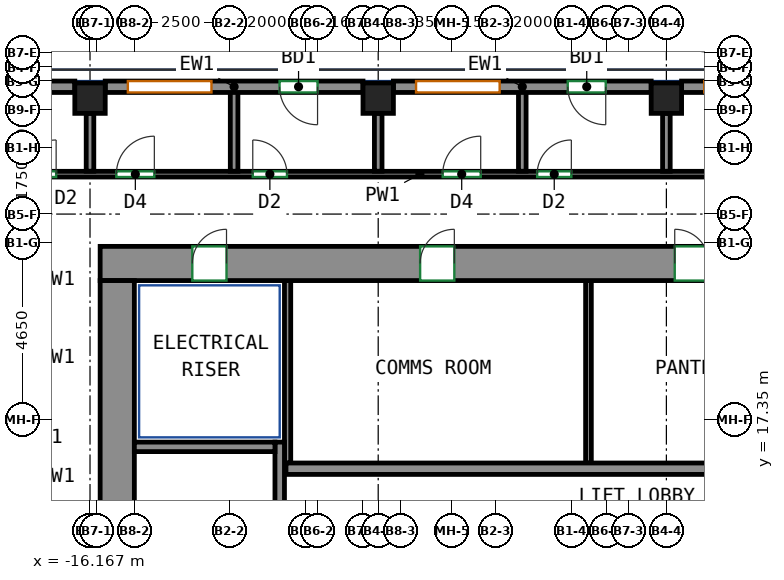
"""IFC4 building model, lengths in metres.
Left out: names, types, materials, properties, quantities, classifications, styles, units other than length and angle.
Written with IfcOpenShell. Run it as: python <this file> out.ifc"""

import sys

from ifc_helpers import new_model, si_unit, direction, frame, frame_2d, origin, origin_2d, place, context, subcontext, project, spatial, rectangle, extrude, source, transform, mapped, element, fill, save


model = new_model("IFC4")
c1 = context("Model", 3, precision=1e-05, world=origin(), true_north=direction((0.0, 1.0)))
c2 = subcontext(c1, "Body", "Model", "MODEL_VIEW")
j1 = project(units=[si_unit("LENGTHUNIT", "METRE"), si_unit("PLANEANGLEUNIT", "RADIAN")], contexts=[c1])
p1 = place(None, origin())
s1 = spatial("IfcSite", under=j1, at=p1, CompositionType="ELEMENT")
p2 = place(p1, origin())
s2 = spatial("IfcBuilding", under=s1, at=p2, CompositionType="ELEMENT")
p3 = place(p2, frame((0.0, 0.0, 168.5)))
s3 = spatial("IfcBuildingStorey", under=s2, at=p3, CompositionType="ELEMENT", Elevation=168.5)
m1 = source(origin(), c2, "Body", "SweptSolid", [
    extrude(rectangle(XDim=0.8, YDim=0.8, at=origin_2d()), origin(), (0.0, 0.0, 1.0), 3.12),
])
for number, where, z_axis, x_axis in (
    (1, (-16.167, 25.8, 0.0), (0.0, 0.0, 1.0), (1.0, 0.0, 0.0)),
    (2, (-8.583, 25.8, 0.0), (0.0, 0.0, 1.0), (1.0, 0.0, 0.0)),
    (3, (-1.0, 25.8, 0.0), (0.0, 0.0, 1.0), (1.0, 0.0, 0.0)),
):
    element("IfcColumn", number, at=place(p3, frame(where, z_axis=z_axis, x_axis=x_axis)), inside=s3, PredefinedType="COLUMN", context=c2, shape_type="MappedRepresentation", body=[
        mapped(m1, transform((0.0, 0.0, 0.0))),
    ])
m2 = source(origin(), c2, "Body", "SweptSolid", [
    extrude(rectangle(XDim=33.9, YDim=0.9, at=frame_2d((16.95, 0.0))), origin(), (0.0, 0.0, 1.0), 3.12),
])
p4 = place(p3, frame((-15.9, 21.45, 0.0), z_axis=(0.0, 0.0, 1.0), x_axis=(1.0, 0.0, 0.0)))
e4 = element("IfcWall", 4, at=p4, inside=s3, PredefinedType="SHEAR", context=c2, shape_type="MappedRepresentation", body=[
    mapped(m2, transform((0.0, 0.0, 0.0))),
])
p5 = place(p4, frame((8.42, 0.0, 0.0)))
e5 = element("IfcOpeningElement", 5, at=p5, cuts=e4, PredefinedType="OPENING", context=c2, shape_type="SweptSolid", body=[
    extrude(rectangle(XDim=0.9, YDim=2.1, at=frame_2d((0.45, 1.05))), frame((0.0, 0.46, 0.0), z_axis=(0.0, -1.0, 0.0), x_axis=(1.0, 0.0, 0.0)), (0.0, 0.0, 1.0), 0.92),
])
p6 = place(p4, frame((15.12, 0.0, 0.0)))
e6 = element("IfcOpeningElement", 6, at=p6, cuts=e4, PredefinedType="OPENING", context=c2, shape_type="SweptSolid", body=[
    extrude(rectangle(XDim=0.9, YDim=2.1, at=frame_2d((0.45, 1.05))), frame((0.0, 0.46, 0.0), z_axis=(0.0, -1.0, 0.0), x_axis=(1.0, 0.0, 0.0)), (0.0, 0.0, 1.0), 0.92),
])
p7 = place(p4, frame((19.944, 0.0, 0.0)))
e7 = element("IfcOpeningElement", 7, at=p7, cuts=e4, PredefinedType="OPENING", context=c2, shape_type="SweptSolid", body=[
    extrude(rectangle(XDim=0.9, YDim=2.1, at=frame_2d((0.45, 1.05))), frame((0.0, 0.46, 0.0), z_axis=(0.0, -1.0, 0.0), x_axis=(1.0, 0.0, 0.0)), (0.0, 0.0, 1.0), 0.92),
])
p8 = place(p4, frame((25.304, 0.0, 0.0)))
e8 = element("IfcOpeningElement", 8, at=p8, cuts=e4, PredefinedType="OPENING", context=c2, shape_type="SweptSolid", body=[
    extrude(rectangle(XDim=0.9, YDim=2.1, at=frame_2d((0.45, 1.05))), frame((0.0, 0.46, 0.0), z_axis=(0.0, -1.0, 0.0), x_axis=(1.0, 0.0, 0.0)), (0.0, 0.0, 1.0), 0.92),
])
p9 = place(p4, frame((2.425, 0.0, 0.0)))
e9 = element("IfcOpeningElement", 9, at=p9, cuts=e4, PredefinedType="OPENING", context=c2, shape_type="SweptSolid", body=[
    extrude(rectangle(XDim=0.9, YDim=2.1, at=frame_2d((0.45, 1.05))), frame((0.0, 0.46, 0.0), z_axis=(0.0, -1.0, 0.0), x_axis=(1.0, 0.0, 0.0)), (0.0, 0.0, 1.0), 0.92),
])
p10 = place(p4, frame((30.575, 0.0, 0.0)))
e10 = element("IfcOpeningElement", 10, at=p10, cuts=e4, PredefinedType="OPENING", context=c2, shape_type="SweptSolid", body=[
    extrude(rectangle(XDim=0.9, YDim=2.1, at=frame_2d((0.45, 1.05))), frame((0.0, 0.46, 0.0), z_axis=(0.0, -1.0, 0.0), x_axis=(1.0, 0.0, 0.0)), (0.0, 0.0, 1.0), 0.92),
])
m3 = source(origin(), c2, "Body", "SweptSolid", [
    extrude(rectangle(XDim=12.0, YDim=0.9, at=frame_2d((6.0, 0.0))), origin(), (0.0, 0.0, 1.0), 3.12),
])
p11 = place(p3, frame((-15.45, 9.0, 0.0), z_axis=(0.0, 0.0, 1.0), x_axis=(0.0, 1.0, 0.0)))
e11 = element("IfcWall", 11, at=p11, inside=s3, PredefinedType="SHEAR", context=c2, shape_type="MappedRepresentation", body=[
    mapped(m3, transform((0.0, 0.0, 0.0))),
])
m4 = source(origin(), c2, "Body", "SweptSolid", [
    extrude(rectangle(XDim=7.75, YDim=0.25, at=frame_2d((3.875, 0.0))), origin(), (0.0, 0.0, 1.0), 3.12),
])
p12 = place(p3, frame((-11.175, 9.0, 0.0), z_axis=(0.0, 0.0, 1.0), x_axis=(0.0, 1.0, 0.0)))
e12 = element("IfcWall", 12, at=p12, inside=s3, PredefinedType="SHEAR", context=c2, shape_type="MappedRepresentation", body=[
    mapped(m4, transform((0.0, 0.0, 0.0))),
])
m5 = source(origin(), c2, "Body", "SweptSolid", [
    extrude(rectangle(XDim=3.7, YDim=0.25, at=frame_2d((1.85, 0.0))), origin(), (0.0, 0.0, 1.0), 3.12),
])
p13 = place(p3, frame((-15.0, 16.625, 0.0), z_axis=(0.0, 0.0, 1.0), x_axis=(1.0, 0.0, 0.0)))
e13 = element("IfcWall", 13, at=p13, inside=s3, PredefinedType="SHEAR", context=c2, shape_type="MappedRepresentation", body=[
    mapped(m5, transform((0.0, 0.0, 0.0))),
])
m6 = source(origin(), c2, "Body", "SweptSolid", [
    extrude(rectangle(XDim=14.04, YDim=0.3, at=frame_2d((7.02, 0.0))), origin(), (0.0, 0.0, 1.0), 3.12),
])
p14 = place(p3, frame((-11.01, 16.05, 0.0), z_axis=(0.0, 0.0, 1.0), x_axis=(1.0, 0.0, 0.0)))
e14 = element("IfcWall", 14, at=p14, inside=s3, PredefinedType="SHEAR", context=c2, shape_type="MappedRepresentation", body=[
    mapped(m6, transform((0.0, 0.0, 0.0))),
])
m7 = source(origin(), c2, "Body", "SweptSolid", [
    extrude(rectangle(XDim=6.783, YDim=0.3, at=frame_2d((3.392, 0.0))), origin(), (0.0, 0.0, 1.0), 3.12),
])
p15 = place(p3, frame((6.183, 26.1, 0.0), z_axis=(0.0, 0.0, 1.0), x_axis=(-1.0, 0.0, 0.0)))
e15 = element("IfcWall", 15, at=p15, inside=s3, PredefinedType="SOLIDWALL", context=c2, shape_type="MappedRepresentation", body=[
    mapped(m7, transform((0.0, 0.0, 0.0))),
])
p16 = place(p15, frame((1.196, 0.0, 0.0)))
e16 = element("IfcOpeningElement", 16, at=p16, cuts=e15, PredefinedType="OPENING", context=c2, shape_type="SweptSolid", body=[
    extrude(rectangle(XDim=1.0, YDim=2.1, at=frame_2d((0.5, 1.05))), frame((0.0, 0.16, 0.0), z_axis=(0.0, -1.0, 0.0), x_axis=(1.0, 0.0, 0.0)), (0.0, 0.0, 1.0), 0.32),
])
p17 = place(p15, frame((3.988, 0.0, 0.85)))
e17 = element("IfcOpeningElement", 17, at=p17, cuts=e15, PredefinedType="OPENING", context=c2, shape_type="SweptSolid", body=[
    extrude(rectangle(XDim=2.2, YDim=1.95, at=frame_2d((1.1, 0.975))), frame((0.0, 0.16, 0.0), z_axis=(0.0, -1.0, 0.0), x_axis=(1.0, 0.0, 0.0)), (0.0, 0.0, 1.0), 0.32),
])
p18 = place(p3, frame((-1.4, 26.1, 0.0), z_axis=(0.0, 0.0, 1.0), x_axis=(-1.0, 0.0, 0.0)))
e18 = element("IfcWall", 18, at=p18, inside=s3, PredefinedType="SOLIDWALL", context=c2, shape_type="MappedRepresentation", body=[
    mapped(m7, transform((0.0, 0.0, 0.0))),
])
p19 = place(p18, frame((1.196, 0.0, 0.0)))
e19 = element("IfcOpeningElement", 19, at=p19, cuts=e18, PredefinedType="OPENING", context=c2, shape_type="SweptSolid", body=[
    extrude(rectangle(XDim=1.0, YDim=2.1, at=frame_2d((0.5, 1.05))), frame((0.0, 0.16, 0.0), z_axis=(0.0, -1.0, 0.0), x_axis=(1.0, 0.0, 0.0)), (0.0, 0.0, 1.0), 0.32),
])
p20 = place(p18, frame((3.988, 0.0, 0.85)))
e20 = element("IfcOpeningElement", 20, at=p20, cuts=e18, PredefinedType="OPENING", context=c2, shape_type="SweptSolid", body=[
    extrude(rectangle(XDim=2.2, YDim=1.95, at=frame_2d((1.1, 0.975))), frame((0.0, 0.16, 0.0), z_axis=(0.0, -1.0, 0.0), x_axis=(1.0, 0.0, 0.0)), (0.0, 0.0, 1.0), 0.32),
])
m8 = source(origin(), c2, "Body", "SweptSolid", [
    extrude(rectangle(XDim=6.783, YDim=0.3, at=frame_2d((3.392, 0.0))), origin(), (0.0, 0.0, 1.0), 3.12),
])
p21 = place(p3, frame((-8.983, 26.1, 0.0), z_axis=(0.0, 0.0, 1.0), x_axis=(-1.0, 0.0, 0.0)))
e21 = element("IfcWall", 21, at=p21, inside=s3, PredefinedType="SOLIDWALL", context=c2, shape_type="MappedRepresentation", body=[
    mapped(m8, transform((0.0, 0.0, 0.0))),
])
p22 = place(p21, frame((1.196, 0.0, 0.0)))
e22 = element("IfcOpeningElement", 22, at=p22, cuts=e21, PredefinedType="OPENING", context=c2, shape_type="SweptSolid", body=[
    extrude(rectangle(XDim=1.0, YDim=2.1, at=frame_2d((0.5, 1.05))), frame((0.0, 0.16, 0.0), z_axis=(0.0, -1.0, 0.0), x_axis=(1.0, 0.0, 0.0)), (0.0, 0.0, 1.0), 0.32),
])
p23 = place(p21, frame((3.988, 0.0, 0.85)))
e23 = element("IfcOpeningElement", 23, at=p23, cuts=e21, PredefinedType="OPENING", context=c2, shape_type="SweptSolid", body=[
    extrude(rectangle(XDim=2.2, YDim=1.95, at=frame_2d((1.1, 0.975))), frame((0.0, 0.16, 0.0), z_axis=(0.0, -1.0, 0.0), x_axis=(1.0, 0.0, 0.0)), (0.0, 0.0, 1.0), 0.32),
])
p24 = place(p3, frame((-16.567, 26.1, 0.0), z_axis=(0.0, 0.0, 1.0), x_axis=(-1.0, 0.0, 0.0)))
e24 = element("IfcWall", 24, at=p24, inside=s3, PredefinedType="SOLIDWALL", context=c2, shape_type="MappedRepresentation", body=[
    mapped(m7, transform((0.0, 0.0, 0.0))),
])
p25 = place(p24, frame((1.196, 0.0, 0.0)))
e25 = element("IfcOpeningElement", 25, at=p25, cuts=e24, PredefinedType="OPENING", context=c2, shape_type="SweptSolid", body=[
    extrude(rectangle(XDim=1.0, YDim=2.1, at=frame_2d((0.5, 1.05))), frame((0.0, 0.16, 0.0), z_axis=(0.0, -1.0, 0.0), x_axis=(1.0, 0.0, 0.0)), (0.0, 0.0, 1.0), 0.32),
])
p26 = place(p24, frame((3.988, 0.0, 0.85)))
e26 = element("IfcOpeningElement", 26, at=p26, cuts=e24, PredefinedType="OPENING", context=c2, shape_type="SweptSolid", body=[
    extrude(rectangle(XDim=2.2, YDim=1.95, at=frame_2d((1.1, 0.975))), frame((0.0, 0.16, 0.0), z_axis=(0.0, -1.0, 0.0), x_axis=(1.0, 0.0, 0.0)), (0.0, 0.0, 1.0), 0.32),
])
m9 = source(origin(), c2, "Body", "SweptSolid", [
    extrude(rectangle(XDim=4.8, YDim=0.165, at=frame_2d((2.4, 0.0))), origin(), (0.0, 0.0, 1.0), 3.12),
])
p27 = place(p3, frame((-10.968, 16.2, 0.0), z_axis=(0.0, 0.0, 1.0), x_axis=(0.0, 1.0, 0.0)))
e27 = element("IfcWall", 27, at=p27, inside=s3, PredefinedType="PARTITIONING", context=c2, shape_type="MappedRepresentation", body=[
    mapped(m9, transform((0.0, 0.0, 0.0))),
])
m10 = source(origin(), c2, "Body", "SweptSolid", [
    extrude(rectangle(XDim=4.8, YDim=0.15, at=frame_2d((2.4, 0.0))), origin(), (0.0, 0.0, 1.0), 3.12),
])
p28 = place(p3, frame((-3.05, 16.2, 0.0), z_axis=(0.0, 0.0, 1.0), x_axis=(0.0, 1.0, 0.0)))
e28 = element("IfcWall", 28, at=p28, inside=s3, PredefinedType="PARTITIONING", context=c2, shape_type="MappedRepresentation", body=[
    mapped(m10, transform((0.0, 0.0, 0.0))),
])
p29 = place(p3, frame((-20.059, 23.8, 0.0), z_axis=(0.0, 0.0, 1.0), x_axis=(1.0, 0.0, 0.0)))
e29 = element("IfcWall", 29, at=p29, inside=s3, PredefinedType="PARTITIONING", context=c2, shape_type="SweptSolid", body=[
    extrude(rectangle(XDim=41.909, YDim=0.15, at=frame_2d((20.955, 0.0))), origin(), (0.0, 0.0, 1.0), 3.12),
])
p30 = place(p29, frame((2.101, 0.0, 0.0)))
e30 = element("IfcOpeningElement", 30, at=p30, cuts=e29, PredefinedType="OPENING", context=c2, shape_type="SweptSolid", body=[
    extrude(rectangle(XDim=0.9, YDim=2.1, at=frame_2d((0.45, 1.05))), frame((0.0, 0.085, 0.0), z_axis=(0.0, -1.0, 0.0), x_axis=(1.0, 0.0, 0.0)), (0.0, 0.0, 1.0), 0.17),
])
p31 = place(p29, frame((4.585, 0.0, 0.0)))
e31 = element("IfcOpeningElement", 31, at=p31, cuts=e29, PredefinedType="OPENING", context=c2, shape_type="SweptSolid", body=[
    extrude(rectangle(XDim=1.0, YDim=2.1, at=frame_2d((0.5, 1.05))), frame((0.0, 0.085, 0.0), z_axis=(0.0, -1.0, 0.0), x_axis=(1.0, 0.0, 0.0)), (0.0, 0.0, 1.0), 0.17),
])
p32 = place(p29, frame((8.175, 0.0, 0.0)))
e32 = element("IfcOpeningElement", 32, at=p32, cuts=e29, PredefinedType="OPENING", context=c2, shape_type="SweptSolid", body=[
    extrude(rectangle(XDim=0.9, YDim=2.1, at=frame_2d((0.45, 1.05))), frame((0.0, 0.085, 0.0), z_axis=(0.0, -1.0, 0.0), x_axis=(1.0, 0.0, 0.0)), (0.0, 0.0, 1.0), 0.17),
])
p33 = place(p29, frame((13.173, 0.0, 0.0)))
e33 = element("IfcOpeningElement", 33, at=p33, cuts=e29, PredefinedType="OPENING", context=c2, shape_type="SweptSolid", body=[
    extrude(rectangle(XDim=1.0, YDim=2.1, at=frame_2d((0.5, 1.05))), frame((0.0, 0.085, 0.0), z_axis=(0.0, -1.0, 0.0), x_axis=(1.0, 0.0, 0.0)), (0.0, 0.0, 1.0), 0.17),
])
p34 = place(p29, frame((15.658, 0.0, 0.0)))
e34 = element("IfcOpeningElement", 34, at=p34, cuts=e29, PredefinedType="OPENING", context=c2, shape_type="SweptSolid", body=[
    extrude(rectangle(XDim=0.9, YDim=2.1, at=frame_2d((0.45, 1.05))), frame((0.0, 0.085, 0.0), z_axis=(0.0, -1.0, 0.0), x_axis=(1.0, 0.0, 0.0)), (0.0, 0.0, 1.0), 0.17),
])
p35 = place(p29, frame((21.315, 0.0, 0.0)))
e35 = element("IfcOpeningElement", 35, at=p35, cuts=e29, PredefinedType="OPENING", context=c2, shape_type="SweptSolid", body=[
    extrude(rectangle(XDim=0.9, YDim=2.1, at=frame_2d((0.45, 1.05))), frame((0.0, 0.085, 0.0), z_axis=(0.0, -1.0, 0.0), x_axis=(1.0, 0.0, 0.0)), (0.0, 0.0, 1.0), 0.17),
])
p36 = place(p29, frame((24.625, 0.0, 0.0)))
e36 = element("IfcOpeningElement", 36, at=p36, cuts=e29, PredefinedType="OPENING", context=c2, shape_type="SweptSolid", body=[
    extrude(rectangle(XDim=1.0, YDim=2.1, at=frame_2d((0.5, 1.05))), frame((0.0, 0.085, 0.0), z_axis=(0.0, -1.0, 0.0), x_axis=(1.0, 0.0, 0.0)), (0.0, 0.0, 1.0), 0.17),
])
p37 = place(p29, frame((29.043, 0.0, 0.0)))
e37 = element("IfcOpeningElement", 37, at=p37, cuts=e29, PredefinedType="OPENING", context=c2, shape_type="SweptSolid", body=[
    extrude(rectangle(XDim=0.9, YDim=2.1, at=frame_2d((0.45, 1.05))), frame((0.0, 0.085, 0.0), z_axis=(0.0, -1.0, 0.0), x_axis=(1.0, 0.0, 0.0)), (0.0, 0.0, 1.0), 0.17),
])
p38 = place(p29, frame((32.735, 0.0, 0.0)))
e38 = element("IfcOpeningElement", 38, at=p38, cuts=e29, PredefinedType="OPENING", context=c2, shape_type="SweptSolid", body=[
    extrude(rectangle(XDim=1.0, YDim=2.1, at=frame_2d((0.5, 1.05))), frame((0.0, 0.085, 0.0), z_axis=(0.0, -1.0, 0.0), x_axis=(1.0, 0.0, 0.0)), (0.0, 0.0, 1.0), 0.17),
])
p39 = place(p29, frame((36.627, 0.0, 0.0)))
e39 = element("IfcOpeningElement", 39, at=p39, cuts=e29, PredefinedType="OPENING", context=c2, shape_type="SweptSolid", body=[
    extrude(rectangle(XDim=0.9, YDim=2.1, at=frame_2d((0.45, 1.05))), frame((0.0, 0.085, 0.0), z_axis=(0.0, -1.0, 0.0), x_axis=(1.0, 0.0, 0.0)), (0.0, 0.0, 1.0), 0.17),
])
p40 = place(p29, frame((38.808, 0.0, 0.0)))
e40 = element("IfcOpeningElement", 40, at=p40, cuts=e29, PredefinedType="OPENING", context=c2, shape_type="SweptSolid", body=[
    extrude(rectangle(XDim=0.9, YDim=2.1, at=frame_2d((0.45, 1.05))), frame((0.0, 0.085, 0.0), z_axis=(0.0, -1.0, 0.0), x_axis=(1.0, 0.0, 0.0)), (0.0, 0.0, 1.0), 0.17),
])
p41 = place(p3, frame((-16.167, 23.877, 0.0), z_axis=(0.0, 0.0, 1.0), x_axis=(0.0, 1.0, 0.0)))
e41 = element("IfcWall", 41, at=p41, inside=s3, PredefinedType="PARTITIONING", context=c2, shape_type="SweptSolid", body=[
    extrude(rectangle(XDim=1.523, YDim=0.2, at=frame_2d((0.761, 0.0))), origin(), (0.0, 0.0, 1.0), 3.12),
])
p42 = place(p3, frame((-12.375, 23.877, 0.0), z_axis=(0.0, 0.0, 1.0), x_axis=(0.0, 1.0, 0.0)))
e42 = element("IfcWall", 42, at=p42, inside=s3, PredefinedType="PARTITIONING", context=c2, shape_type="SweptSolid", body=[
    extrude(rectangle(XDim=2.123, YDim=0.2, at=frame_2d((1.062, 0.0))), origin(), (0.0, 0.0, 1.0), 3.12),
])
p43 = place(p3, frame((-8.583, 23.877, 0.0), z_axis=(0.0, 0.0, 1.0), x_axis=(0.0, 1.0, 0.0)))
e43 = element("IfcWall", 43, at=p43, inside=s3, PredefinedType="PARTITIONING", context=c2, shape_type="SweptSolid", body=[
    extrude(rectangle(XDim=1.523, YDim=0.2, at=frame_2d((0.761, 0.0))), origin(), (0.0, 0.0, 1.0), 3.12),
])
p44 = place(p3, frame((-4.792, 23.877, 0.0), z_axis=(0.0, 0.0, 1.0), x_axis=(0.0, 1.0, 0.0)))
e44 = element("IfcWall", 44, at=p44, inside=s3, PredefinedType="PARTITIONING", context=c2, shape_type="SweptSolid", body=[
    extrude(rectangle(XDim=2.123, YDim=0.2, at=frame_2d((1.062, 0.0))), origin(), (0.0, 0.0, 1.0), 3.12),
])
p45 = place(p3, frame((-1.0, 23.877, 0.0), z_axis=(0.0, 0.0, 1.0), x_axis=(0.0, 1.0, 0.0)))
e45 = element("IfcWall", 45, at=p45, inside=s3, PredefinedType="PARTITIONING", context=c2, shape_type="SweptSolid", body=[
    extrude(rectangle(XDim=1.523, YDim=0.2, at=frame_2d((0.761, 0.0))), origin(), (0.0, 0.0, 1.0), 3.12),
])
p46 = place(p17, origin())
e46 = element("IfcWindow", 46, at=p46, inside=s3, PartitioningType="SINGLE_PANEL", PredefinedType="WINDOW", context=c2, shape_type="SweptSolid", body=[
    extrude(rectangle(XDim=2.2, YDim=1.95, at=frame_2d((1.1, 0.975))), frame((0.0, 0.03, 0.0), z_axis=(0.0, -1.0, 0.0), x_axis=(1.0, 0.0, 0.0)), (0.0, 0.0, 1.0), 0.06),
])
fill(e17, e46)
p47 = place(p19, origin())
e47 = element("IfcDoor", 47, at=p47, inside=s3, OperationType="SINGLE_SWING_LEFT", PredefinedType="DOOR", context=c2, shape_type="SweptSolid", body=[
    extrude(rectangle(XDim=1.0, YDim=2.1, at=frame_2d((0.5, 1.05))), frame((0.0, 0.025, 0.0), z_axis=(0.0, -1.0, 0.0), x_axis=(1.0, 0.0, 0.0)), (0.0, 0.0, 1.0), 0.05),
])
fill(e19, e47)
p48 = place(p20, origin())
e48 = element("IfcWindow", 48, at=p48, inside=s3, PartitioningType="SINGLE_PANEL", PredefinedType="WINDOW", context=c2, shape_type="SweptSolid", body=[
    extrude(rectangle(XDim=2.2, YDim=1.95, at=frame_2d((1.1, 0.975))), frame((0.0, 0.03, 0.0), z_axis=(0.0, -1.0, 0.0), x_axis=(1.0, 0.0, 0.0)), (0.0, 0.0, 1.0), 0.06),
])
fill(e20, e48)
p49 = place(p22, origin())
e49 = element("IfcDoor", 49, at=p49, inside=s3, OperationType="SINGLE_SWING_LEFT", PredefinedType="DOOR", context=c2, shape_type="SweptSolid", body=[
    extrude(rectangle(XDim=1.0, YDim=2.1, at=frame_2d((0.5, 1.05))), frame((0.0, 0.025, 0.0), z_axis=(0.0, -1.0, 0.0), x_axis=(1.0, 0.0, 0.0)), (0.0, 0.0, 1.0), 0.05),
])
fill(e22, e49)
p50 = place(p23, origin())
e50 = element("IfcWindow", 50, at=p50, inside=s3, PartitioningType="SINGLE_PANEL", PredefinedType="WINDOW", context=c2, shape_type="SweptSolid", body=[
    extrude(rectangle(XDim=2.2, YDim=1.95, at=frame_2d((1.1, 0.975))), frame((0.0, 0.03, 0.0), z_axis=(0.0, -1.0, 0.0), x_axis=(1.0, 0.0, 0.0)), (0.0, 0.0, 1.0), 0.06),
])
fill(e23, e50)
p51 = place(p5, origin())
e51 = element("IfcDoor", 51, at=p51, inside=s3, OperationType="SINGLE_SWING_RIGHT", PredefinedType="DOOR", context=c2, shape_type="SweptSolid", body=[
    extrude(rectangle(XDim=0.9, YDim=2.1, at=frame_2d((0.45, 1.05))), frame((0.0, -0.305, 0.0), z_axis=(0.0, -1.0, 0.0), x_axis=(1.0, 0.0, 0.0)), (0.0, 0.0, 1.0), 0.05),
])
fill(e5, e51)
p52 = place(p6, origin())
e52 = element("IfcDoor", 52, at=p52, inside=s3, OperationType="SINGLE_SWING_LEFT", PredefinedType="DOOR", context=c2, shape_type="SweptSolid", body=[
    extrude(rectangle(XDim=0.9, YDim=2.1, at=frame_2d((0.45, 1.05))), frame((0.0, -0.305, 0.0), z_axis=(0.0, -1.0, 0.0), x_axis=(1.0, 0.0, 0.0)), (0.0, 0.0, 1.0), 0.05),
])
fill(e6, e52)
p53 = place(p9, origin())
e53 = element("IfcDoor", 53, at=p53, inside=s3, OperationType="SINGLE_SWING_RIGHT", PredefinedType="DOOR", context=c2, shape_type="SweptSolid", body=[
    extrude(rectangle(XDim=0.9, YDim=2.1, at=frame_2d((0.45, 1.05))), frame((0.0, -0.305, 0.0), z_axis=(0.0, -1.0, 0.0), x_axis=(1.0, 0.0, 0.0)), (0.0, 0.0, 1.0), 0.05),
])
fill(e9, e53)
p54 = place(p30, origin())
e54 = element("IfcDoor", 54, at=p54, inside=s3, OperationType="SINGLE_SWING_RIGHT", PredefinedType="DOOR", context=c2, shape_type="SweptSolid", body=[
    extrude(rectangle(XDim=0.9, YDim=2.1, at=frame_2d((0.45, 1.05))), frame((0.0, 0.025, 0.0), z_axis=(0.0, -1.0, 0.0), x_axis=(1.0, 0.0, 0.0)), (0.0, 0.0, 1.0), 0.05),
])
fill(e30, e54)
p55 = place(p31, origin())
e55 = element("IfcDoor", 55, at=p55, inside=s3, OperationType="SINGLE_SWING_RIGHT", PredefinedType="DOOR", context=c2, shape_type="SweptSolid", body=[
    extrude(rectangle(XDim=1.0, YDim=2.1, at=frame_2d((0.5, 1.05))), frame((0.0, 0.025, 0.0), z_axis=(0.0, -1.0, 0.0), x_axis=(1.0, 0.0, 0.0)), (0.0, 0.0, 1.0), 0.05),
])
fill(e31, e55)
p56 = place(p32, origin())
e56 = element("IfcDoor", 56, at=p56, inside=s3, OperationType="SINGLE_SWING_LEFT", PredefinedType="DOOR", context=c2, shape_type="SweptSolid", body=[
    extrude(rectangle(XDim=0.9, YDim=2.1, at=frame_2d((0.45, 1.05))), frame((0.0, 0.025, 0.0), z_axis=(0.0, -1.0, 0.0), x_axis=(1.0, 0.0, 0.0)), (0.0, 0.0, 1.0), 0.05),
])
fill(e32, e56)
p57 = place(p33, origin())
e57 = element("IfcDoor", 57, at=p57, inside=s3, OperationType="SINGLE_SWING_RIGHT", PredefinedType="DOOR", context=c2, shape_type="SweptSolid", body=[
    extrude(rectangle(XDim=1.0, YDim=2.1, at=frame_2d((0.5, 1.05))), frame((0.0, 0.025, 0.0), z_axis=(0.0, -1.0, 0.0), x_axis=(1.0, 0.0, 0.0)), (0.0, 0.0, 1.0), 0.05),
])
fill(e33, e57)
p58 = place(p34, origin())
e58 = element("IfcDoor", 58, at=p58, inside=s3, OperationType="SINGLE_SWING_RIGHT", PredefinedType="DOOR", context=c2, shape_type="SweptSolid", body=[
    extrude(rectangle(XDim=0.9, YDim=2.1, at=frame_2d((0.45, 1.05))), frame((0.0, 0.025, 0.0), z_axis=(0.0, -1.0, 0.0), x_axis=(1.0, 0.0, 0.0)), (0.0, 0.0, 1.0), 0.05),
])
fill(e34, e58)
save(model, sys.argv[1])
